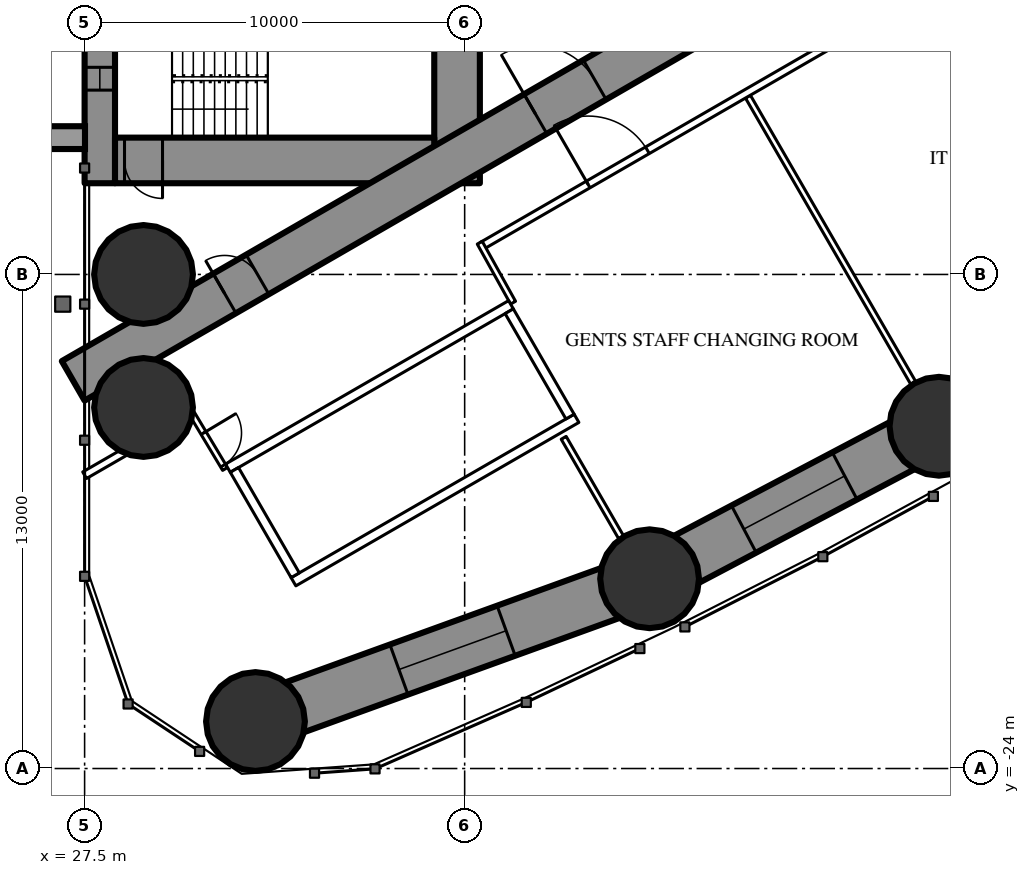
"""IFC4 building model, lengths in metres.
Left out: names, types, materials, properties, quantities, classifications, styles, units other than length and angle.
Written with IfcOpenShell. Run it as: python <this file> out.ifc"""

import sys

from ifc_helpers import new_model, si_unit, direction, frame, frame_2d, origin, origin_2d, place, context, subcontext, project, spatial, rectangle, hollow_circle, extrude, element, fill, save


model = new_model("IFC4")
c1 = context("Model", 3, precision=1e-05, world=origin(), true_north=direction((0.0, 1.0)))
c2 = subcontext(c1, "Body", "Model", "MODEL_VIEW")
j1 = project(units=[si_unit("LENGTHUNIT", "METRE"), si_unit("PLANEANGLEUNIT", "RADIAN")], contexts=[c1])
p1 = place(None, origin())
s1 = spatial("IfcSite", under=j1, at=p1, CompositionType="ELEMENT")
p2 = place(p1, origin())
s2 = spatial("IfcBuilding", under=s1, at=p2, CompositionType="ELEMENT")
p3 = place(p2, frame((0.0, 0.0, 143.1)))
s3 = spatial("IfcBuildingStorey", under=s2, at=p3, CompositionType="ELEMENT", Elevation=143.1)
for number, where, z_axis, x_axis in (
    (1, (31.996, -22.763, 0.0), (0.0, 0.0, 1.0), (1.0, 0.0, 0.0)),
    (2, (29.05, -11.0, 0.0), (0.0, 0.0, 1.0), (1.0, 0.0, 0.0)),
    (3, (29.05, -14.5, 0.0), (0.0, 0.0, 1.0), (1.0, 0.0, 0.0)),
    (4, (42.366, -19.007, 0.0), (0.0, 0.0, 1.0), (1.0, 0.0, 0.0)),
    (5, (49.979, -14.994, 0.0), (0.0, 0.0, 1.0), (1.0, 0.0, 0.0)),
):
    element("IfcColumn", number, at=place(p3, frame(where, z_axis=z_axis, x_axis=x_axis)), inside=s3, PredefinedType="COLUMN", context=c2, shape_type="SweptSolid", body=[
        extrude(hollow_circle(Radius=1.3, WallThickness=0.1, at=origin_2d()), origin(), (0.0, 0.0, 1.0), 3.6),
    ])
p4 = place(p3, frame((27.9, -8.6, 0.0), z_axis=(0.0, 0.0, 1.0), x_axis=(0.0, 1.0, 0.0)))
e6 = element("IfcWall", 6, at=p4, inside=s3, PredefinedType="SHEAR", context=c2, shape_type="SweptSolid", body=[
    extrude(rectangle(XDim=17.2, YDim=0.8, at=frame_2d((8.6, 0.0))), origin(), (0.0, 0.0, 1.0), 3.6),
])
p5 = place(p4, frame((2.45, 0.0, 0.6)))
e7 = element("IfcOpeningElement", 7, at=p5, cuts=e6, PredefinedType="OPENING", context=c2, shape_type="SweptSolid", body=[
    extrude(rectangle(XDim=0.6, YDim=2.1, at=frame_2d((0.3, 1.05))), frame((0.0, 0.41, 0.0), z_axis=(0.0, -1.0, 0.0), x_axis=(1.0, 0.0, 0.0)), (0.0, 0.0, 1.0), 0.82),
])
p6 = place(p4, frame((14.15, 0.0, 0.6)))
e8 = element("IfcOpeningElement", 8, at=p6, cuts=e6, PredefinedType="OPENING", context=c2, shape_type="SweptSolid", body=[
    extrude(rectangle(XDim=0.6, YDim=2.1, at=frame_2d((0.3, 1.05))), frame((0.0, 0.41, 0.0), z_axis=(0.0, -1.0, 0.0), x_axis=(1.0, 0.0, 0.0)), (0.0, 0.0, 1.0), 0.82),
])
p7 = place(p3, frame((37.3, -8.6, 0.0), z_axis=(0.0, 0.0, 1.0), x_axis=(0.0, 1.0, 0.0)))
e9 = element("IfcWall", 9, at=p7, inside=s3, PredefinedType="SHEAR", context=c2, shape_type="SweptSolid", body=[
    extrude(rectangle(XDim=17.2, YDim=1.2, at=frame_2d((8.6, 0.0))), origin(), (0.0, 0.0, 1.0), 3.6),
])
p8 = place(p7, frame((7.7, 0.0, 0.0)))
e10 = element("IfcOpeningElement", 10, at=p8, cuts=e9, PredefinedType="OPENING", context=c2, shape_type="SweptSolid", body=[
    extrude(rectangle(XDim=1.8, YDim=2.2, at=frame_2d((0.9, 1.1))), frame((0.0, 0.61, 0.0), z_axis=(0.0, -1.0, 0.0), x_axis=(1.0, 0.0, 0.0)), (0.0, 0.0, 1.0), 1.22),
])
p9 = place(p3, frame((28.3, -8.0, 0.0), z_axis=(0.0, 0.0, 1.0), x_axis=(1.0, 0.0, 0.0)))
e11 = element("IfcWall", 11, at=p9, inside=s3, PredefinedType="SHEAR", context=c2, shape_type="SweptSolid", body=[
    extrude(rectangle(XDim=8.4, YDim=1.2, at=frame_2d((4.2, 0.0))), origin(), (0.0, 0.0, 1.0), 3.6),
])
p10 = place(p9, frame((0.25, 0.0, 0.0)))
e12 = element("IfcOpeningElement", 12, at=p10, cuts=e11, PredefinedType="OPENING", context=c2, shape_type="SweptSolid", body=[
    extrude(rectangle(XDim=1.0, YDim=2.2, at=frame_2d((0.5, 1.1))), frame((0.0, 0.61, 0.0), z_axis=(0.0, -1.0, 0.0), x_axis=(1.0, 0.0, 0.0)), (0.0, 0.0, 1.0), 1.22),
])
p11 = place(p3, frame((27.2, -13.8, 0.0), z_axis=(0.0, 0.0, 1.0), x_axis=(0.866027159892, 0.499996958321, 0.0)))
e13 = element("IfcWall", 13, at=p11, inside=s3, PredefinedType="SHEAR", context=c2, shape_type="SweptSolid", body=[
    extrude(rectangle(XDim=27.947, YDim=1.2, at=frame_2d((13.973, 0.0))), origin(), (0.0, 0.0, 1.0), 3.6),
])
p12 = place(p11, frame((4.6, 0.0, 0.0)))
e14 = element("IfcOpeningElement", 14, at=p12, cuts=e13, PredefinedType="OPENING", context=c2, shape_type="SweptSolid", body=[
    extrude(rectangle(XDim=1.0, YDim=2.2, at=frame_2d((0.5, 1.1))), frame((0.0, 0.61, 0.0), z_axis=(0.0, -1.0, 0.0), x_axis=(1.0, 0.0, 0.0)), (0.0, 0.0, 1.0), 1.22),
])
p13 = place(p11, frame((14.045, 0.0, 0.0)))
e15 = element("IfcOpeningElement", 15, at=p13, cuts=e13, PredefinedType="OPENING", context=c2, shape_type="SweptSolid", body=[
    extrude(rectangle(XDim=1.8, YDim=2.2, at=frame_2d((0.9, 1.1))), frame((0.0, 0.61, 0.0), z_axis=(0.0, -1.0, 0.0), x_axis=(1.0, 0.0, 0.0)), (0.0, 0.0, 1.0), 1.22),
])
p14 = place(p3, frame((31.996, -22.763, 0.0), z_axis=(0.0, 0.0, 1.0), x_axis=(0.940225039526, 0.340553777029, 0.0)))
e16 = element("IfcWall", 16, at=p14, inside=s3, PredefinedType="SHEAR", context=c2, shape_type="SweptSolid", body=[
    extrude(rectangle(XDim=11.029, YDim=1.4, at=frame_2d((5.515, 0.0))), origin(), (0.0, 0.0, 1.0), 3.6),
])
p15 = place(p14, frame((4.015, 0.0, 0.6)))
e17 = element("IfcOpeningElement", 17, at=p15, cuts=e16, PredefinedType="OPENING", context=c2, shape_type="SweptSolid", body=[
    extrude(rectangle(XDim=3.0, YDim=1.2, at=frame_2d((1.5, 0.6))), frame((0.0, 0.71, 0.0), z_axis=(0.0, -1.0, 0.0), x_axis=(1.0, 0.0, 0.0)), (0.0, 0.0, 1.0), 1.42),
])
p16 = place(p3, frame((42.366, -19.007, 0.0), z_axis=(0.0, 0.0, 1.0), x_axis=(0.884632510133, 0.466288882578, 0.0)))
e18 = element("IfcWall", 18, at=p16, inside=s3, PredefinedType="SHEAR", context=c2, shape_type="SweptSolid", body=[
    extrude(rectangle(XDim=8.606, YDim=1.4, at=frame_2d((4.303, 0.0))), origin(), (0.0, 0.0, 1.0), 3.6),
])
p17 = place(p16, frame((2.803, 0.0, 0.6)))
e19 = element("IfcOpeningElement", 19, at=p17, cuts=e18, PredefinedType="OPENING", context=c2, shape_type="SweptSolid", body=[
    extrude(rectangle(XDim=3.0, YDim=1.2, at=frame_2d((1.5, 0.6))), frame((0.0, 0.71, 0.0), z_axis=(0.0, -1.0, 0.0), x_axis=(1.0, 0.0, 0.0)), (0.0, 0.0, 1.0), 1.42),
])
p18 = place(p3, frame((49.979, -14.994, 0.0), z_axis=(0.0, 0.0, 1.0), x_axis=(0.849312372751, 0.527890607505, 0.0)))
e20 = element("IfcWall", 20, at=p18, inside=s3, PredefinedType="SHEAR", context=c2, shape_type="SweptSolid", body=[
    extrude(rectangle(XDim=12.906, YDim=1.4, at=frame_2d((6.453, 0.0))), origin(), (0.0, 0.0, 1.0), 3.6),
])
p19 = place(p18, frame((4.953, 0.0, 0.6)))
e21 = element("IfcOpeningElement", 21, at=p19, cuts=e20, PredefinedType="OPENING", context=c2, shape_type="SweptSolid", body=[
    extrude(rectangle(XDim=3.0, YDim=1.2, at=frame_2d((1.5, 0.6))), frame((0.0, 0.71, 0.0), z_axis=(0.0, -1.0, 0.0), x_axis=(1.0, 0.0, 0.0)), (0.0, 0.0, 1.0), 1.42),
])
p20 = place(p3, frame((44.954, -6.321, 0.0), z_axis=(0.0, 0.0, 1.0), x_axis=(0.500018676722, -0.866014620505, 0.0)))
e22 = element("IfcWall", 22, at=p20, inside=s3, PredefinedType="PARTITIONING", context=c2, shape_type="SweptSolid", body=[
    extrude(rectangle(XDim=8.704, YDim=0.15, at=frame_2d((4.352, 0.0))), origin(), (0.0, 0.0, 1.0), 2.15),
])
p21 = place(p3, frame((40.105, -15.299, 0.0), z_axis=(0.0, 0.0, 1.0), x_axis=(0.499978822259, -0.866037630414, 0.0)))
e23 = element("IfcWall", 23, at=p21, inside=s3, PredefinedType="PARTITIONING", context=c2, shape_type="SweptSolid", body=[
    extrude(rectangle(XDim=3.023, YDim=0.15, at=frame_2d((1.511, 0.0))), origin(), (0.0, 0.0, 1.0), 3.35),
])
p22 = place(p3, frame((27.5, -16.282, 0.0), z_axis=(0.0, 0.0, 1.0), x_axis=(0.866039938485, 0.499974824316, 0.0)))
e24 = element("IfcWall", 24, at=p22, inside=s3, PredefinedType="PARTITIONING", context=c2, shape_type="SweptSolid", body=[
    extrude(rectangle(XDim=3.238, YDim=0.2, at=frame_2d((1.619, 0.0))), origin(), (0.0, 0.0, 1.0), 3.35),
])
p23 = place(p3, frame((37.96, -10.243, 0.0), z_axis=(0.0, 0.0, 1.0), x_axis=(0.866026429433, 0.499998223521, 0.0)))
e25 = element("IfcWall", 25, at=p23, inside=s3, PredefinedType="PARTITIONING", context=c2, shape_type="SweptSolid", body=[
    extrude(rectangle(XDim=20.487, YDim=0.2, at=frame_2d((10.243, 0.0))), origin(), (0.0, 0.0, 1.0), 3.35),
])
p24 = place(p23, frame((11.464, 0.0, 0.0)))
e26 = element("IfcOpeningElement", 26, at=p24, cuts=e25, PredefinedType="OPENING", context=c2, shape_type="SweptSolid", body=[
    extrude(rectangle(XDim=1.8, YDim=2.2, at=frame_2d((0.9, 1.1))), frame((0.0, 0.11, 0.0), z_axis=(0.0, -1.0, 0.0), x_axis=(1.0, 0.0, 0.0)), (0.0, 0.0, 1.0), 0.22),
])
p25 = place(p23, frame((17.586, 0.0, 0.0)))
e27 = element("IfcOpeningElement", 27, at=p25, cuts=e25, PredefinedType="OPENING", context=c2, shape_type="SweptSolid", body=[
    extrude(rectangle(XDim=1.8, YDim=2.14, at=frame_2d((0.9, 1.07))), frame((0.0, 0.11, 0.0), z_axis=(0.0, -1.0, 0.0), x_axis=(1.0, 0.0, 0.0)), (0.0, 0.0, 1.0), 0.22),
])
p26 = place(p23, frame((3.221, 0.0, 0.0)))
e28 = element("IfcOpeningElement", 28, at=p26, cuts=e25, PredefinedType="OPENING", context=c2, shape_type="SweptSolid", body=[
    extrude(rectangle(XDim=1.8, YDim=2.2, at=frame_2d((0.9, 1.1))), frame((0.0, 0.11, 0.0), z_axis=(0.0, -1.0, 0.0), x_axis=(1.0, 0.0, 0.0)), (0.0, 0.0, 1.0), 0.22),
])
p27 = place(p3, frame((30.267, -14.569, 0.0), z_axis=(0.0, 0.0, 1.0), x_axis=(0.514336634837, -0.857588377991, 0.0)))
e29 = element("IfcWall", 29, at=p27, inside=s3, PredefinedType="PARTITIONING", context=c2, shape_type="SweptSolid", body=[
    extrude(rectangle(XDim=1.805, YDim=0.15, at=frame_2d((0.903, 0.0))), origin(), (0.0, 0.0, 1.0), 3.35),
])
p28 = place(p27, frame((0.703, 0.0, 0.0)))
e30 = element("IfcOpeningElement", 30, at=p28, cuts=e29, PredefinedType="OPENING", context=c2, shape_type="SweptSolid", body=[
    extrude(rectangle(XDim=1.0, YDim=2.14, at=frame_2d((0.5, 1.07))), frame((0.0, 0.085, 0.0), z_axis=(0.0, -1.0, 0.0), x_axis=(1.0, 0.0, 0.0)), (0.0, 0.0, 1.0), 0.17),
])
p29 = place(p3, frame((38.773, -11.742, 0.0), z_axis=(0.0, 0.0, 1.0), x_axis=(-0.485528096672, 0.8742210632, 0.0)))
e31 = element("IfcWall", 31, at=p29, inside=s3, PredefinedType="PARTITIONING", context=c2, shape_type="SweptSolid", body=[
    extrude(rectangle(XDim=1.805, YDim=0.15, at=frame_2d((0.903, 0.0))), origin(), (0.0, 0.0, 1.0), 3.35),
])
for number, where, z_axis, x_axis in (
    (32, (31.271, -16.097, 0.0), (0.0, 0.0, 1.0), (0.866, 0.5, 0.0)),
    (33, (32.996, -19.086, 0.0), (0.0, 0.0, 1.0), (0.866, 0.5, 0.0)),
):
    element("IfcWall", number, at=place(p3, frame(where, z_axis=z_axis, x_axis=x_axis)), inside=s3, PredefinedType="PARTITIONING", context=c2, shape_type="SweptSolid", body=[
        extrude(rectangle(XDim=8.6, YDim=0.25, at=frame_2d((4.3, 0.0))), origin(), (0.0, 0.0, 1.0), 3.35),
    ])
for number, where, z_axis, x_axis in (
    (34, (31.441, -16.143, 0.0), (0.0, 0.0, 1.0), (0.5, -0.866, 0.0)),
    (35, (38.673, -11.968, 0.0), (0.0, 0.0, 1.0), (0.5, -0.866, 0.0)),
):
    element("IfcWall", number, at=place(p3, frame(where, z_axis=z_axis, x_axis=x_axis)), inside=s3, PredefinedType="PARTITIONING", context=c2, shape_type="SweptSolid", body=[
        extrude(rectangle(XDim=3.201, YDim=0.25, at=frame_2d((1.6, 0.0))), origin(), (0.0, 0.0, 1.0), 3.35),
    ])
p30 = place(p15, origin())
e36 = element("IfcWindow", 36, at=p30, inside=s3, PartitioningType="SINGLE_PANEL", PredefinedType="WINDOW", context=c2, shape_type="SweptSolid", body=[
    extrude(rectangle(XDim=3.0, YDim=1.2, at=frame_2d((1.5, 0.6))), frame((0.0, 0.03, 0.0), z_axis=(0.0, -1.0, 0.0), x_axis=(1.0, 0.0, 0.0)), (0.0, 0.0, 1.0), 0.06),
])
fill(e17, e36)
p31 = place(p17, origin())
e37 = element("IfcWindow", 37, at=p31, inside=s3, PartitioningType="SINGLE_PANEL", PredefinedType="WINDOW", context=c2, shape_type="SweptSolid", body=[
    extrude(rectangle(XDim=3.0, YDim=1.2, at=frame_2d((1.5, 0.6))), frame((0.0, 0.03, 0.0), z_axis=(0.0, -1.0, 0.0), x_axis=(1.0, 0.0, 0.0)), (0.0, 0.0, 1.0), 0.06),
])
fill(e19, e37)
p32 = place(p28, origin())
e38 = element("IfcDoor", 38, at=p32, inside=s3, OperationType="SINGLE_SWING_LEFT", PredefinedType="DOOR", context=c2, shape_type="SweptSolid", body=[
    extrude(rectangle(XDim=1.0, YDim=2.14, at=frame_2d((0.5, 1.07))), frame((0.0, 0.025, 0.0), z_axis=(0.0, -1.0, 0.0), x_axis=(1.0, 0.0, 0.0)), (0.0, 0.0, 1.0), 0.05),
])
fill(e30, e38)
p33 = place(p26, origin())
e39 = element("IfcDoor", 39, at=p33, inside=s3, OperationType="DOUBLE_DOOR_SINGLE_SWING", PredefinedType="DOOR", context=c2, shape_type="SweptSolid", body=[
    extrude(rectangle(XDim=1.8, YDim=2.2, at=frame_2d((0.9, 1.1))), frame((0.0, 0.025, 0.0), z_axis=(0.0, -1.0, 0.0), x_axis=(1.0, 0.0, 0.0)), (0.0, 0.0, 1.0), 0.05),
])
fill(e28, e39)
p34 = place(p12, origin())
e40 = element("IfcDoor", 40, at=p34, inside=s3, OperationType="SINGLE_SWING_LEFT", PredefinedType="DOOR", context=c2, shape_type="SweptSolid", body=[
    extrude(rectangle(XDim=1.0, YDim=2.2, at=frame_2d((0.5, 1.1))), frame((0.0, 0.025, 0.0), z_axis=(0.0, -1.0, 0.0), x_axis=(1.0, 0.0, 0.0)), (0.0, 0.0, 1.0), 0.05),
])
fill(e14, e40)
p35 = place(p13, origin())
e41 = element("IfcDoor", 41, at=p35, inside=s3, OperationType="DOUBLE_DOOR_SINGLE_SWING", PredefinedType="DOOR", context=c2, shape_type="SweptSolid", body=[
    extrude(rectangle(XDim=1.8, YDim=2.2, at=frame_2d((0.9, 1.1))), frame((0.0, 0.025, 0.0), z_axis=(0.0, -1.0, 0.0), x_axis=(1.0, 0.0, 0.0)), (0.0, 0.0, 1.0), 0.05),
])
fill(e15, e41)
p36 = place(p10, origin())
e42 = element("IfcDoor", 42, at=p36, inside=s3, OperationType="SINGLE_SWING_RIGHT", PredefinedType="DOOR", context=c2, shape_type="SweptSolid", body=[
    extrude(rectangle(XDim=1.0, YDim=2.2, at=frame_2d((0.5, 1.1))), frame((0.0, 0.025, 0.0), z_axis=(0.0, -1.0, 0.0), x_axis=(1.0, 0.0, 0.0)), (0.0, 0.0, 1.0), 0.05),
])
fill(e12, e42)
p37 = place(p5, origin())
e43 = element("IfcWindow", 43, at=p37, inside=s3, PartitioningType="SINGLE_PANEL", PredefinedType="WINDOW", context=c2, shape_type="SweptSolid", body=[
    extrude(rectangle(XDim=0.6, YDim=2.1, at=frame_2d((0.3, 1.05))), frame((0.0, 0.03, 0.0), z_axis=(0.0, -1.0, 0.0), x_axis=(1.0, 0.0, 0.0)), (0.0, 0.0, 1.0), 0.06),
])
fill(e7, e43)
save(model, sys.argv[1])
